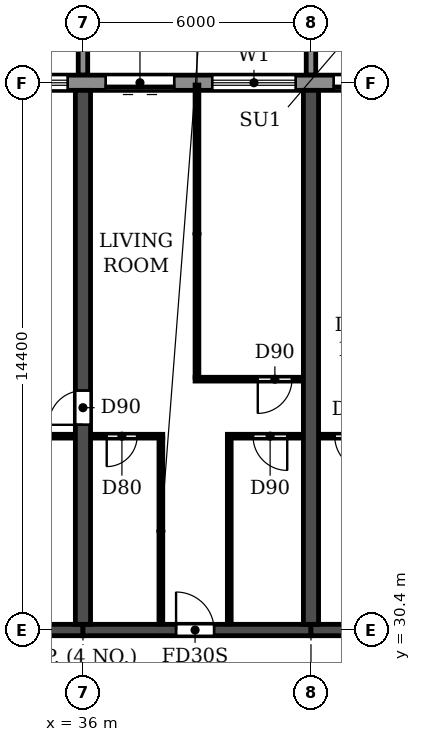
"""IFC4 building model, lengths in metres.
Left out: names, types, materials, properties, quantities, classifications, styles, units other than length and angle.
Written with IfcOpenShell. Run it as: python <this file> out.ifc"""

import sys

from ifc_helpers import new_model, si_unit, direction, frame, frame_2d, origin, place, context, subcontext, project, spatial, polyline, rectangle, outline, extrude, source, transform, mapped, element, fill, save


model = new_model("IFC4")
c1 = context("Model", 3, precision=1e-05, world=origin(), true_north=direction((0.0, 1.0)))
c2 = subcontext(c1, "Body", "Model", "MODEL_VIEW")
j1 = project(units=[si_unit("LENGTHUNIT", "METRE"), si_unit("PLANEANGLEUNIT", "RADIAN")], contexts=[c1])
p1 = place(None, origin())
s1 = spatial("IfcSite", under=j1, at=p1, CompositionType="ELEMENT")
p2 = place(p1, origin())
s2 = spatial("IfcBuilding", under=s1, at=p2, CompositionType="ELEMENT")
p3 = place(p2, frame((0.0, 0.0, 63.0)))
s3 = spatial("IfcBuildingStorey", under=s2, at=p3, CompositionType="ELEMENT", Elevation=63.0)
p4 = place(p3, frame((36.0, 30.55, 0.0), z_axis=(0.0, 0.0, 1.0), x_axis=(0.0, 1.0, 0.0)))
e1 = element("IfcWall", 1, at=p4, inside=s3, PredefinedType="SHEAR", context=c2, shape_type="SweptSolid", body=[
    extrude(rectangle(XDim=14.05, YDim=0.4, at=frame_2d((7.025, 0.0))), origin(), (0.0, 0.0, 1.0), 2.95),
])
p5 = place(p4, frame((5.25, 0.0, 0.0)))
e2 = element("IfcOpeningElement", 2, at=p5, cuts=e1, PredefinedType="OPENING", context=c2, shape_type="SweptSolid", body=[
    extrude(rectangle(XDim=0.9, YDim=2.1, at=frame_2d((0.45, 1.05))), frame((0.0, 0.21, 0.0), z_axis=(0.0, -1.0, 0.0), x_axis=(1.0, 0.0, 0.0)), (0.0, 0.0, 1.0), 0.42),
])
p6 = place(p3, frame((42.0, 30.55, 0.0), z_axis=(0.0, 0.0, 1.0), x_axis=(0.0, 1.0, 0.0)))
e3 = element("IfcWall", 3, at=p6, inside=s3, PredefinedType="SHEAR", context=c2, shape_type="SweptSolid", body=[
    extrude(rectangle(XDim=14.05, YDim=0.4, at=frame_2d((7.025, 0.0))), origin(), (0.0, 0.0, 1.0), 2.95),
])
p7 = place(p3, frame((30.0, 30.4, 0.0), z_axis=(0.0, 0.0, 1.0), x_axis=(1.0, 0.0, 0.0)))
e4 = element("IfcWall", 4, at=p7, inside=s3, PredefinedType="SHEAR", context=c2, shape_type="SweptSolid", body=[
    extrude(rectangle(XDim=6.0, YDim=0.3, at=frame_2d((3.0, 0.0))), origin(), (0.0, 0.0, 1.0), 2.35),
])
p8 = place(p3, frame((36.0, 30.4, 0.0), z_axis=(0.0, 0.0, 1.0), x_axis=(1.0, 0.0, 0.0)))
e5 = element("IfcWall", 5, at=p8, inside=s3, PredefinedType="SHEAR", context=c2, shape_type="SweptSolid", body=[
    extrude(rectangle(XDim=6.0, YDim=0.3, at=frame_2d((3.0, 0.0))), origin(), (0.0, 0.0, 1.0), 2.35),
])
p9 = place(p8, frame((2.45, 0.0, 0.0)))
e6 = element("IfcOpeningElement", 6, at=p9, cuts=e5, PredefinedType="OPENING", context=c2, shape_type="SweptSolid", body=[
    extrude(rectangle(XDim=1.0, YDim=2.1, at=frame_2d((0.5, 1.05))), frame((0.0, 0.16, 0.0), z_axis=(0.0, -1.0, 0.0), x_axis=(1.0, 0.0, 0.0)), (0.0, 0.0, 1.0), 0.32),
])
p10 = place(p3, frame((42.0, 30.4, 0.0), z_axis=(0.0, 0.0, 1.0), x_axis=(1.0, 0.0, 0.0)))
e7 = element("IfcWall", 7, at=p10, inside=s3, PredefinedType="SHEAR", context=c2, shape_type="SweptSolid", body=[
    extrude(rectangle(XDim=6.0, YDim=0.3, at=frame_2d((3.0, 0.0))), origin(), (0.0, 0.0, 1.0), 2.35),
])
p11 = place(p10, frame((2.55, 0.0, 0.0)))
e8 = element("IfcOpeningElement", 8, at=p11, cuts=e7, PredefinedType="OPENING", context=c2, shape_type="SweptSolid", body=[
    extrude(rectangle(XDim=1.0, YDim=2.1, at=frame_2d((0.5, 1.05))), frame((0.0, 0.16, 0.0), z_axis=(0.0, -1.0, 0.0), x_axis=(1.0, 0.0, 0.0)), (0.0, 0.0, 1.0), 0.32),
])
p12 = place(p3, frame((91.317, 44.8, 0.0), z_axis=(0.0, 0.0, 1.0), x_axis=(-1.0, 0.0, 0.0)))
e9 = element("IfcWall", 9, at=p12, inside=s3, PredefinedType="STANDARD", context=c2, shape_type="SweptSolid", body=[
    extrude(rectangle(XDim=80.634, YDim=0.4, at=frame_2d((40.317, 0.0))), origin(), (0.0, 0.0, 1.0), 2.95),
])
p13 = place(p12, frame((76.717, 0.0, 0.9)))
e10 = element("IfcOpeningElement", 10, at=p13, cuts=e9, PredefinedType="OPENING", context=c2, shape_type="SweptSolid", body=[
    extrude(rectangle(XDim=2.2, YDim=1.5, at=frame_2d((1.1, 0.75))), frame((0.0, 0.21, 0.0), z_axis=(0.0, -1.0, 0.0), x_axis=(1.0, 0.0, 0.0)), (0.0, 0.0, 1.0), 0.42),
])
p14 = place(p12, frame((73.917, 0.0, 0.0)))
e11 = element("IfcOpeningElement", 11, at=p14, cuts=e9, PredefinedType="OPENING", context=c2, shape_type="SweptSolid", body=[
    extrude(rectangle(XDim=1.8, YDim=2.4, at=frame_2d((0.9, 1.2))), frame((0.0, 0.21, 0.0), z_axis=(0.0, -1.0, 0.0), x_axis=(1.0, 0.0, 0.0)), (0.0, 0.0, 1.0), 0.42),
])
p15 = place(p12, frame((70.717, 0.0, 0.9)))
e12 = element("IfcOpeningElement", 12, at=p15, cuts=e9, PredefinedType="OPENING", context=c2, shape_type="SweptSolid", body=[
    extrude(rectangle(XDim=2.2, YDim=1.5, at=frame_2d((1.1, 0.75))), frame((0.0, 0.21, 0.0), z_axis=(0.0, -1.0, 0.0), x_axis=(1.0, 0.0, 0.0)), (0.0, 0.0, 1.0), 0.42),
])
p16 = place(p12, frame((67.917, 0.0, 0.0)))
e13 = element("IfcOpeningElement", 13, at=p16, cuts=e9, PredefinedType="OPENING", context=c2, shape_type="SweptSolid", body=[
    extrude(rectangle(XDim=1.8, YDim=2.4, at=frame_2d((0.9, 1.2))), frame((0.0, 0.21, 0.0), z_axis=(0.0, -1.0, 0.0), x_axis=(1.0, 0.0, 0.0)), (0.0, 0.0, 1.0), 0.42),
])
p17 = place(p12, frame((64.717, 0.0, 0.9)))
e14 = element("IfcOpeningElement", 14, at=p17, cuts=e9, PredefinedType="OPENING", context=c2, shape_type="SweptSolid", body=[
    extrude(rectangle(XDim=2.2, YDim=1.5, at=frame_2d((1.1, 0.75))), frame((0.0, 0.21, 0.0), z_axis=(0.0, -1.0, 0.0), x_axis=(1.0, 0.0, 0.0)), (0.0, 0.0, 1.0), 0.42),
])
p18 = place(p12, frame((61.917, 0.0, 0.0)))
e15 = element("IfcOpeningElement", 15, at=p18, cuts=e9, PredefinedType="OPENING", context=c2, shape_type="SweptSolid", body=[
    extrude(rectangle(XDim=1.8, YDim=2.4, at=frame_2d((0.9, 1.2))), frame((0.0, 0.21, 0.0), z_axis=(0.0, -1.0, 0.0), x_axis=(1.0, 0.0, 0.0)), (0.0, 0.0, 1.0), 0.42),
])
p19 = place(p12, frame((58.717, 0.0, 0.9)))
e16 = element("IfcOpeningElement", 16, at=p19, cuts=e9, PredefinedType="OPENING", context=c2, shape_type="SweptSolid", body=[
    extrude(rectangle(XDim=2.2, YDim=1.5, at=frame_2d((1.1, 0.75))), frame((0.0, 0.21, 0.0), z_axis=(0.0, -1.0, 0.0), x_axis=(1.0, 0.0, 0.0)), (0.0, 0.0, 1.0), 0.42),
])
p20 = place(p12, frame((55.717, 0.0, 0.9)))
e17 = element("IfcOpeningElement", 17, at=p20, cuts=e9, PredefinedType="OPENING", context=c2, shape_type="SweptSolid", body=[
    extrude(rectangle(XDim=2.2, YDim=1.5, at=frame_2d((1.1, 0.75))), frame((0.0, 0.21, 0.0), z_axis=(0.0, -1.0, 0.0), x_axis=(1.0, 0.0, 0.0)), (0.0, 0.0, 1.0), 0.42),
])
p21 = place(p12, frame((52.917, 0.0, 0.0)))
e18 = element("IfcOpeningElement", 18, at=p21, cuts=e9, PredefinedType="OPENING", context=c2, shape_type="SweptSolid", body=[
    extrude(rectangle(XDim=1.8, YDim=2.4, at=frame_2d((0.9, 1.2))), frame((0.0, 0.21, 0.0), z_axis=(0.0, -1.0, 0.0), x_axis=(1.0, 0.0, 0.0)), (0.0, 0.0, 1.0), 0.42),
])
p22 = place(p12, frame((49.717, 0.0, 0.9)))
e19 = element("IfcOpeningElement", 19, at=p22, cuts=e9, PredefinedType="OPENING", context=c2, shape_type="SweptSolid", body=[
    extrude(rectangle(XDim=2.2, YDim=1.5, at=frame_2d((1.1, 0.75))), frame((0.0, 0.21, 0.0), z_axis=(0.0, -1.0, 0.0), x_axis=(1.0, 0.0, 0.0)), (0.0, 0.0, 1.0), 0.42),
])
p23 = place(p12, frame((46.917, 0.0, 0.0)))
e20 = element("IfcOpeningElement", 20, at=p23, cuts=e9, PredefinedType="OPENING", context=c2, shape_type="SweptSolid", body=[
    extrude(rectangle(XDim=1.8, YDim=2.4, at=frame_2d((0.9, 1.2))), frame((0.0, 0.21, 0.0), z_axis=(0.0, -1.0, 0.0), x_axis=(1.0, 0.0, 0.0)), (0.0, 0.0, 1.0), 0.42),
])
p24 = place(p12, frame((43.717, 0.0, 0.9)))
e21 = element("IfcOpeningElement", 21, at=p24, cuts=e9, PredefinedType="OPENING", context=c2, shape_type="SweptSolid", body=[
    extrude(rectangle(XDim=2.2, YDim=1.5, at=frame_2d((1.1, 0.75))), frame((0.0, 0.21, 0.0), z_axis=(0.0, -1.0, 0.0), x_axis=(1.0, 0.0, 0.0)), (0.0, 0.0, 1.0), 0.42),
])
p25 = place(p12, frame((40.717, 0.0, 0.9)))
e22 = element("IfcOpeningElement", 22, at=p25, cuts=e9, PredefinedType="OPENING", context=c2, shape_type="SweptSolid", body=[
    extrude(rectangle(XDim=2.2, YDim=1.5, at=frame_2d((1.1, 0.75))), frame((0.0, 0.21, 0.0), z_axis=(0.0, -1.0, 0.0), x_axis=(1.0, 0.0, 0.0)), (0.0, 0.0, 1.0), 0.42),
])
p26 = place(p12, frame((37.717, 0.0, 0.9)))
e23 = element("IfcOpeningElement", 23, at=p26, cuts=e9, PredefinedType="OPENING", context=c2, shape_type="SweptSolid", body=[
    extrude(rectangle(XDim=2.2, YDim=1.5, at=frame_2d((1.1, 0.75))), frame((0.0, 0.21, 0.0), z_axis=(0.0, -1.0, 0.0), x_axis=(1.0, 0.0, 0.0)), (0.0, 0.0, 1.0), 0.42),
])
p27 = place(p12, frame((34.717, 0.0, 0.9)))
e24 = element("IfcOpeningElement", 24, at=p27, cuts=e9, PredefinedType="OPENING", context=c2, shape_type="SweptSolid", body=[
    extrude(rectangle(XDim=2.2, YDim=1.5, at=frame_2d((1.1, 0.75))), frame((0.0, 0.21, 0.0), z_axis=(0.0, -1.0, 0.0), x_axis=(1.0, 0.0, 0.0)), (0.0, 0.0, 1.0), 0.42),
])
p28 = place(p12, frame((31.917, 0.0, 0.0)))
e25 = element("IfcOpeningElement", 25, at=p28, cuts=e9, PredefinedType="OPENING", context=c2, shape_type="SweptSolid", body=[
    extrude(rectangle(XDim=1.8, YDim=2.4, at=frame_2d((0.9, 1.2))), frame((0.0, 0.21, 0.0), z_axis=(0.0, -1.0, 0.0), x_axis=(1.0, 0.0, 0.0)), (0.0, 0.0, 1.0), 0.42),
])
p29 = place(p12, frame((28.917, 0.0, 0.0)))
e26 = element("IfcOpeningElement", 26, at=p29, cuts=e9, PredefinedType="OPENING", context=c2, shape_type="SweptSolid", body=[
    extrude(rectangle(XDim=1.8, YDim=2.4, at=frame_2d((0.9, 1.2))), frame((0.0, 0.21, 0.0), z_axis=(0.0, -1.0, 0.0), x_axis=(1.0, 0.0, 0.0)), (0.0, 0.0, 1.0), 0.42),
])
p30 = place(p12, frame((25.717, 0.0, 0.9)))
e27 = element("IfcOpeningElement", 27, at=p30, cuts=e9, PredefinedType="OPENING", context=c2, shape_type="SweptSolid", body=[
    extrude(rectangle(XDim=2.2, YDim=1.5, at=frame_2d((1.1, 0.75))), frame((0.0, 0.21, 0.0), z_axis=(0.0, -1.0, 0.0), x_axis=(1.0, 0.0, 0.0)), (0.0, 0.0, 1.0), 0.42),
])
p31 = place(p12, frame((22.917, 0.0, 0.0)))
e28 = element("IfcOpeningElement", 28, at=p31, cuts=e9, PredefinedType="OPENING", context=c2, shape_type="SweptSolid", body=[
    extrude(rectangle(XDim=1.8, YDim=2.4, at=frame_2d((0.9, 1.2))), frame((0.0, 0.21, 0.0), z_axis=(0.0, -1.0, 0.0), x_axis=(1.0, 0.0, 0.0)), (0.0, 0.0, 1.0), 0.42),
])
p32 = place(p12, frame((19.717, 0.0, 0.9)))
e29 = element("IfcOpeningElement", 29, at=p32, cuts=e9, PredefinedType="OPENING", context=c2, shape_type="SweptSolid", body=[
    extrude(rectangle(XDim=2.2, YDim=1.5, at=frame_2d((1.1, 0.75))), frame((0.0, 0.21, 0.0), z_axis=(0.0, -1.0, 0.0), x_axis=(1.0, 0.0, 0.0)), (0.0, 0.0, 1.0), 0.42),
])
p33 = place(p12, frame((16.917, 0.0, 0.0)))
e30 = element("IfcOpeningElement", 30, at=p33, cuts=e9, PredefinedType="OPENING", context=c2, shape_type="SweptSolid", body=[
    extrude(rectangle(XDim=1.8, YDim=2.4, at=frame_2d((0.9, 1.2))), frame((0.0, 0.21, 0.0), z_axis=(0.0, -1.0, 0.0), x_axis=(1.0, 0.0, 0.0)), (0.0, 0.0, 1.0), 0.42),
])
p34 = place(p12, frame((13.717, 0.0, 0.9)))
e31 = element("IfcOpeningElement", 31, at=p34, cuts=e9, PredefinedType="OPENING", context=c2, shape_type="SweptSolid", body=[
    extrude(rectangle(XDim=2.2, YDim=1.5, at=frame_2d((1.1, 0.75))), frame((0.0, 0.21, 0.0), z_axis=(0.0, -1.0, 0.0), x_axis=(1.0, 0.0, 0.0)), (0.0, 0.0, 1.0), 0.42),
])
p35 = place(p12, frame((10.917, 0.0, 0.0)))
e32 = element("IfcOpeningElement", 32, at=p35, cuts=e9, PredefinedType="OPENING", context=c2, shape_type="SweptSolid", body=[
    extrude(rectangle(XDim=1.8, YDim=2.4, at=frame_2d((0.9, 1.2))), frame((0.0, 0.21, 0.0), z_axis=(0.0, -1.0, 0.0), x_axis=(1.0, 0.0, 0.0)), (0.0, 0.0, 1.0), 0.42),
])
p36 = place(p12, frame((7.717, 0.0, 0.9)))
e33 = element("IfcOpeningElement", 33, at=p36, cuts=e9, PredefinedType="OPENING", context=c2, shape_type="SweptSolid", body=[
    extrude(rectangle(XDim=2.2, YDim=1.5, at=frame_2d((1.1, 0.75))), frame((0.0, 0.21, 0.0), z_axis=(0.0, -1.0, 0.0), x_axis=(1.0, 0.0, 0.0)), (0.0, 0.0, 1.0), 0.42),
])
p37 = place(p12, frame((4.717, 0.0, 0.9)))
e34 = element("IfcOpeningElement", 34, at=p37, cuts=e9, PredefinedType="OPENING", context=c2, shape_type="SweptSolid", body=[
    extrude(rectangle(XDim=2.2, YDim=1.5, at=frame_2d((1.1, 0.75))), frame((0.0, 0.21, 0.0), z_axis=(0.0, -1.0, 0.0), x_axis=(1.0, 0.0, 0.0)), (0.0, 0.0, 1.0), 0.42),
])
p38 = place(p12, frame((1.717, 0.0, 0.9)))
e35 = element("IfcOpeningElement", 35, at=p38, cuts=e9, PredefinedType="OPENING", context=c2, shape_type="SweptSolid", body=[
    extrude(rectangle(XDim=2.2, YDim=1.5, at=frame_2d((1.1, 0.75))), frame((0.0, 0.21, 0.0), z_axis=(0.0, -1.0, 0.0), x_axis=(1.0, 0.0, 0.0)), (0.0, 0.0, 1.0), 0.42),
])
m1 = source(origin(), c2, "Body", "SweptSolid", [
    extrude(outline(polyline([(0.0, 0.0), (0.25, 0.0), (0.25, 3.1), (0.0, 3.1), (0.0, 0.0)])), origin(), (0.0, 0.0, 1.0), 3.1),
])
for number, where in (
    (36, (35.875, 45.0, 0.0)),
    (37, (41.875, 45.0, 0.0)),
):
    element("IfcWall", number, at=place(p3, frame(where)), inside=s3, PredefinedType="STANDARD", context=c2, shape_type="MappedRepresentation", body=[
        mapped(m1, transform((0.0, 0.0, 0.0))),
    ])
p39 = place(p3, frame((33.1, 35.5, 0.0), z_axis=(0.0, 0.0, 1.0), x_axis=(1.0, 0.0, 0.0)))
e38 = element("IfcWall", 38, at=p39, inside=s3, PredefinedType="PARTITIONING", context=c2, shape_type="SweptSolid", body=[
    extrude(rectangle(XDim=2.69, YDim=0.1, at=frame_2d((1.345, 0.0))), origin(), (0.0, 0.0, 1.0), 2.95),
])
p40 = place(p39, frame((1.0, 0.0, 0.0)))
e39 = element("IfcOpeningElement", 39, at=p40, cuts=e38, PredefinedType="OPENING", context=c2, shape_type="SweptSolid", body=[
    extrude(rectangle(XDim=0.8, YDim=2.1, at=frame_2d((0.4, 1.05))), frame((0.0, 0.06, 0.0), z_axis=(0.0, -1.0, 0.0), x_axis=(1.0, 0.0, 0.0)), (0.0, 0.0, 1.0), 0.12),
])
p41 = place(p3, frame((36.21, 35.5, 0.0), z_axis=(0.0, 0.0, 1.0), x_axis=(1.0, 0.0, 0.0)))
e40 = element("IfcWall", 40, at=p41, inside=s3, PredefinedType="PARTITIONING", context=c2, shape_type="SweptSolid", body=[
    extrude(rectangle(XDim=1.89, YDim=0.1, at=frame_2d((0.945, 0.0))), origin(), (0.0, 0.0, 1.0), 2.95),
])
p42 = place(p41, frame((0.415, 0.0, 0.0)))
e41 = element("IfcOpeningElement", 41, at=p42, cuts=e40, PredefinedType="OPENING", context=c2, shape_type="SweptSolid", body=[
    extrude(rectangle(XDim=0.8, YDim=2.1, at=frame_2d((0.4, 1.05))), frame((0.0, 0.06, 0.0), z_axis=(0.0, -1.0, 0.0), x_axis=(1.0, 0.0, 0.0)), (0.0, 0.0, 1.0), 0.12),
])
p43 = place(p3, frame((39.8, 35.5, 0.0), z_axis=(0.0, 0.0, 1.0), x_axis=(1.0, 0.0, 0.0)))
e42 = element("IfcWall", 42, at=p43, inside=s3, PredefinedType="PARTITIONING", context=c2, shape_type="SweptSolid", body=[
    extrude(rectangle(XDim=1.99, YDim=0.1, at=frame_2d((0.995, 0.0))), origin(), (0.0, 0.0, 1.0), 2.95),
])
p44 = place(p43, frame((0.675, 0.0, 0.0)))
e43 = element("IfcOpeningElement", 43, at=p44, cuts=e42, PredefinedType="OPENING", context=c2, shape_type="SweptSolid", body=[
    extrude(rectangle(XDim=0.9, YDim=2.1, at=frame_2d((0.45, 1.05))), frame((0.0, 0.06, 0.0), z_axis=(0.0, -1.0, 0.0), x_axis=(1.0, 0.0, 0.0)), (0.0, 0.0, 1.0), 0.12),
])
p45 = place(p3, frame((42.21, 35.5, 0.0), z_axis=(0.0, 0.0, 1.0), x_axis=(1.0, 0.0, 0.0)))
e44 = element("IfcWall", 44, at=p45, inside=s3, PredefinedType="PARTITIONING", context=c2, shape_type="SweptSolid", body=[
    extrude(rectangle(XDim=1.99, YDim=0.1, at=frame_2d((0.995, 0.0))), origin(), (0.0, 0.0, 1.0), 2.95),
])
p46 = place(p45, frame((0.415, 0.0, 0.0)))
e45 = element("IfcOpeningElement", 45, at=p46, cuts=e44, PredefinedType="OPENING", context=c2, shape_type="SweptSolid", body=[
    extrude(rectangle(XDim=0.9, YDim=2.1, at=frame_2d((0.45, 1.05))), frame((0.0, 0.06, 0.0), z_axis=(0.0, -1.0, 0.0), x_axis=(1.0, 0.0, 0.0)), (0.0, 0.0, 1.0), 0.12),
])
p47 = place(p3, frame((38.95, 37.0, 0.0), z_axis=(0.0, 0.0, 1.0), x_axis=(1.0, 0.0, 0.0)))
e46 = element("IfcWall", 46, at=p47, inside=s3, PredefinedType="PARTITIONING", context=c2, shape_type="SweptSolid", body=[
    extrude(rectangle(XDim=2.84, YDim=0.1, at=frame_2d((1.42, 0.0))), origin(), (0.0, 0.0, 1.0), 2.95),
])
p48 = place(p47, frame((1.65, 0.0, 0.0)))
e47 = element("IfcOpeningElement", 47, at=p48, cuts=e46, PredefinedType="OPENING", context=c2, shape_type="SweptSolid", body=[
    extrude(rectangle(XDim=0.9, YDim=2.1, at=frame_2d((0.45, 1.05))), frame((0.0, 0.06, 0.0), z_axis=(0.0, -1.0, 0.0), x_axis=(1.0, 0.0, 0.0)), (0.0, 0.0, 1.0), 0.12),
])
p49 = place(p3, frame((38.05, 30.56, 0.0), z_axis=(0.0, 0.0, 1.0), x_axis=(0.0, 1.0, 0.0)))
e48 = element("IfcWall", 48, at=p49, inside=s3, PredefinedType="PARTITIONING", context=c2, shape_type="SweptSolid", body=[
    extrude(rectangle(XDim=4.89, YDim=0.1, at=frame_2d((2.445, 0.0))), origin(), (0.0, 0.0, 1.0), 2.95),
])
p50 = place(p3, frame((39.0, 37.05, 0.0), z_axis=(0.0, 0.0, 1.0), x_axis=(0.0, 1.0, 0.0)))
e49 = element("IfcWall", 49, at=p50, inside=s3, PredefinedType="PARTITIONING", context=c2, shape_type="SweptSolid", body=[
    extrude(rectangle(XDim=7.69, YDim=0.1, at=frame_2d((3.845, 0.0))), origin(), (0.0, 0.0, 1.0), 2.95),
])
p51 = place(p3, frame((39.85, 30.56, 0.0), z_axis=(0.0, 0.0, 1.0), x_axis=(0.0, 1.0, 0.0)))
e50 = element("IfcWall", 50, at=p51, inside=s3, PredefinedType="PARTITIONING", context=c2, shape_type="SweptSolid", body=[
    extrude(rectangle(XDim=4.89, YDim=0.1, at=frame_2d((2.445, 0.0))), origin(), (0.0, 0.0, 1.0), 2.95),
])
p52 = place(p20, origin())
e51 = element("IfcWindow", 51, at=p52, inside=s3, PartitioningType="DOUBLE_PANEL_HORIZONTAL", PredefinedType="WINDOW", context=c2, shape_type="SweptSolid", body=[
    extrude(rectangle(XDim=2.2, YDim=1.5, at=frame_2d((1.1, 0.75))), frame((0.0, 0.03, 0.0), z_axis=(0.0, -1.0, 0.0), x_axis=(1.0, 0.0, 0.0)), (0.0, 0.0, 1.0), 0.06),
])
fill(e17, e51)
p53 = place(p21, origin())
e52 = element("IfcDoor", 52, at=p53, inside=s3, OperationType="DOUBLE_DOOR_SLIDING", PredefinedType="DOOR", context=c2, shape_type="SweptSolid", body=[
    extrude(rectangle(XDim=1.8, YDim=2.4, at=frame_2d((0.9, 1.2))), frame((0.0, 0.025, 0.0), z_axis=(0.0, -1.0, 0.0), x_axis=(1.0, 0.0, 0.0)), (0.0, 0.0, 1.0), 0.05),
])
fill(e18, e52)
p54 = place(p22, origin())
e53 = element("IfcWindow", 53, at=p54, inside=s3, PartitioningType="DOUBLE_PANEL_HORIZONTAL", PredefinedType="WINDOW", context=c2, shape_type="SweptSolid", body=[
    extrude(rectangle(XDim=2.2, YDim=1.5, at=frame_2d((1.1, 0.75))), frame((0.0, 0.03, 0.0), z_axis=(0.0, -1.0, 0.0), x_axis=(1.0, 0.0, 0.0)), (0.0, 0.0, 1.0), 0.06),
])
fill(e19, e53)
p55 = place(p23, origin())
e54 = element("IfcDoor", 54, at=p55, inside=s3, OperationType="DOUBLE_DOOR_SLIDING", PredefinedType="DOOR", context=c2, shape_type="SweptSolid", body=[
    extrude(rectangle(XDim=1.8, YDim=2.4, at=frame_2d((0.9, 1.2))), frame((0.0, 0.025, 0.0), z_axis=(0.0, -1.0, 0.0), x_axis=(1.0, 0.0, 0.0)), (0.0, 0.0, 1.0), 0.05),
])
fill(e20, e54)
p56 = place(p5, origin())
e55 = element("IfcDoor", 55, at=p56, inside=s3, OperationType="SINGLE_SWING_LEFT", PredefinedType="DOOR", context=c2, shape_type="SweptSolid", body=[
    extrude(rectangle(XDim=0.9, YDim=2.1, at=frame_2d((0.45, 1.05))), frame((0.0, 0.025, 0.0), z_axis=(0.0, -1.0, 0.0), x_axis=(1.0, 0.0, 0.0)), (0.0, 0.0, 1.0), 0.05),
])
fill(e2, e55)
p57 = place(p42, frame((0.8, 0.0, 0.0), z_axis=(0.0, 0.0, 1.0), x_axis=(-1.0, 0.0, 0.0)))
e56 = element("IfcDoor", 56, at=p57, inside=s3, OperationType="SINGLE_SWING_RIGHT", PredefinedType="DOOR", context=c2, shape_type="SweptSolid", body=[
    extrude(rectangle(XDim=0.8, YDim=2.1, at=frame_2d((0.4, 1.05))), frame((0.0, 0.025, 0.0), z_axis=(0.0, -1.0, 0.0), x_axis=(1.0, 0.0, 0.0)), (0.0, 0.0, 1.0), 0.05),
])
fill(e41, e56)
p58 = place(p9, origin())
e57 = element("IfcDoor", 57, at=p58, inside=s3, OperationType="SINGLE_SWING_LEFT", PredefinedType="DOOR", context=c2, shape_type="SweptSolid", body=[
    extrude(rectangle(XDim=1.0, YDim=2.1, at=frame_2d((0.5, 1.05))), frame((0.0, 0.025, 0.0), z_axis=(0.0, -1.0, 0.0), x_axis=(1.0, 0.0, 0.0)), (0.0, 0.0, 1.0), 0.05),
])
fill(e6, e57)
p59 = place(p44, frame((0.9, 0.0, 0.0), z_axis=(0.0, 0.0, 1.0), x_axis=(-1.0, 0.0, 0.0)))
e58 = element("IfcDoor", 58, at=p59, inside=s3, OperationType="SINGLE_SWING_LEFT", PredefinedType="DOOR", context=c2, shape_type="SweptSolid", body=[
    extrude(rectangle(XDim=0.9, YDim=2.1, at=frame_2d((0.45, 1.05))), frame((0.0, 0.025, 0.0), z_axis=(0.0, -1.0, 0.0), x_axis=(1.0, 0.0, 0.0)), (0.0, 0.0, 1.0), 0.05),
])
fill(e43, e58)
p60 = place(p48, frame((0.9, 0.0, 0.0), z_axis=(0.0, 0.0, 1.0), x_axis=(-1.0, 0.0, 0.0)))
e59 = element("IfcDoor", 59, at=p60, inside=s3, OperationType="SINGLE_SWING_RIGHT", PredefinedType="DOOR", context=c2, shape_type="SweptSolid", body=[
    extrude(rectangle(XDim=0.9, YDim=2.1, at=frame_2d((0.45, 1.05))), frame((0.0, 0.025, 0.0), z_axis=(0.0, -1.0, 0.0), x_axis=(1.0, 0.0, 0.0)), (0.0, 0.0, 1.0), 0.05),
])
fill(e47, e59)
p61 = place(p46, frame((0.9, 0.0, 0.0), z_axis=(0.0, 0.0, 1.0), x_axis=(-1.0, 0.0, 0.0)))
e60 = element("IfcDoor", 60, at=p61, inside=s3, OperationType="SINGLE_SWING_LEFT", PredefinedType="DOOR", context=c2, shape_type="SweptSolid", body=[
    extrude(rectangle(XDim=0.9, YDim=2.1, at=frame_2d((0.45, 1.05))), frame((0.0, 0.025, 0.0), z_axis=(0.0, -1.0, 0.0), x_axis=(1.0, 0.0, 0.0)), (0.0, 0.0, 1.0), 0.05),
])
fill(e45, e60)
save(model, sys.argv[1])
